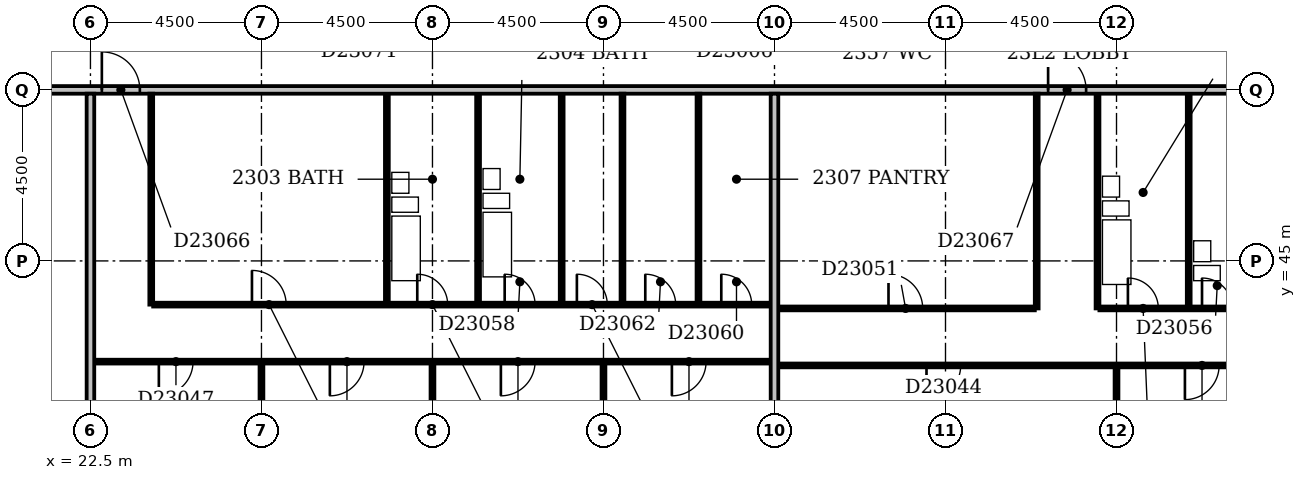
"""IFC4 building model, lengths in metres.
Left out: names, types, materials, properties, quantities, classifications, styles, units other than length and angle.
Written with IfcOpenShell. Run it as: python <this file> out.ifc"""

import sys

from ifc_helpers import new_model, si_unit, direction, frame, frame_2d, origin, place, context, subcontext, project, spatial, rectangle, extrude, element, fill, save


model = new_model("IFC4")
c1 = context("Model", 3, precision=1e-05, world=origin(), true_north=direction((0.0, 1.0)))
c2 = subcontext(c1, "Body", "Model", "MODEL_VIEW")
j1 = project(units=[si_unit("LENGTHUNIT", "METRE"), si_unit("PLANEANGLEUNIT", "RADIAN")], contexts=[c1])
p1 = place(None, origin())
s1 = spatial("IfcSite", under=j1, at=p1, CompositionType="ELEMENT")
p2 = place(p1, origin())
s2 = spatial("IfcBuilding", under=s1, at=p2, CompositionType="ELEMENT")
p3 = place(p2, frame((0.0, 0.0, 93.8)))
s3 = spatial("IfcBuildingStorey", under=s2, at=p3, CompositionType="ELEMENT", Elevation=93.8)
p4 = place(p3, frame((22.5, 36.6, 0.0), z_axis=(0.0, 0.0, 1.0), x_axis=(0.0, 1.0, 0.0)))
e1 = element("IfcWall", 1, at=p4, inside=s3, PredefinedType="PARTITIONING", context=c2, shape_type="SweptSolid", body=[
    extrude(rectangle(XDim=12.8, YDim=0.2, at=frame_2d((6.4, 0.0))), origin(), (0.0, 0.0, 1.0), 3.3),
])
p5 = place(p3, frame((27.0, 36.6, 0.0), z_axis=(0.0, 0.0, 1.0), x_axis=(0.0, 1.0, 0.0)))
e2 = element("IfcWall", 2, at=p5, inside=s3, PredefinedType="PARTITIONING", context=c2, shape_type="SweptSolid", body=[
    extrude(rectangle(XDim=5.7, YDim=0.1, at=frame_2d((2.85, 0.0))), origin(), (0.0, 0.0, 1.0), 2.6),
])
p6 = place(p3, frame((31.5, 36.6, 0.0), z_axis=(0.0, 0.0, 1.0), x_axis=(0.0, 1.0, 0.0)))
e3 = element("IfcWall", 3, at=p6, inside=s3, PredefinedType="PARTITIONING", context=c2, shape_type="SweptSolid", body=[
    extrude(rectangle(XDim=5.7, YDim=0.1, at=frame_2d((2.85, 0.0))), origin(), (0.0, 0.0, 1.0), 3.3),
])
p7 = place(p3, frame((36.0, 36.6, 0.0), z_axis=(0.0, 0.0, 1.0), x_axis=(0.0, 1.0, 0.0)))
e4 = element("IfcWall", 4, at=p7, inside=s3, PredefinedType="PARTITIONING", context=c2, shape_type="SweptSolid", body=[
    extrude(rectangle(XDim=5.7, YDim=0.1, at=frame_2d((2.85, 0.0))), origin(), (0.0, 0.0, 1.0), 2.4),
])
p8 = place(p3, frame((40.5, 36.6, 0.0), z_axis=(0.0, 0.0, 1.0), x_axis=(0.0, 1.0, 0.0)))
e5 = element("IfcWall", 5, at=p8, inside=s3, PredefinedType="PARTITIONING", context=c2, shape_type="SweptSolid", body=[
    extrude(rectangle(XDim=12.8, YDim=0.2, at=frame_2d((6.4, 0.0))), origin(), (0.0, 0.0, 1.0), 3.3),
])
p9 = place(p3, frame((49.5, 36.6, 0.0), z_axis=(0.0, 0.0, 1.0), x_axis=(0.0, 1.0, 0.0)))
e6 = element("IfcWall", 6, at=p9, inside=s3, PredefinedType="PARTITIONING", context=c2, shape_type="SweptSolid", body=[
    extrude(rectangle(XDim=5.6, YDim=0.1, at=frame_2d((2.8, 0.0))), origin(), (0.0, 0.0, 1.0), 3.3),
])
p10 = place(p3, frame((40.6, 42.25, 0.0), z_axis=(0.0, 0.0, 1.0), x_axis=(1.0, 0.0, 0.0)))
e7 = element("IfcWall", 7, at=p10, inside=s3, PredefinedType="PARTITIONING", context=c2, shape_type="SweptSolid", body=[
    extrude(rectangle(XDim=17.8, YDim=0.1, at=frame_2d((8.9, 0.0))), origin(), (0.0, 0.0, 1.0), 3.3),
])
p11 = place(p10, frame((3.9, 0.0, 0.0)))
e8 = element("IfcOpeningElement", 8, at=p11, cuts=e7, PredefinedType="OPENING", context=c2, shape_type="SweptSolid", body=[
    extrude(rectangle(XDim=0.9, YDim=2.1, at=frame_2d((0.45, 1.05))), frame((0.0, 0.062, 0.0), z_axis=(0.0, -1.0, 0.0), x_axis=(1.0, 0.0, 0.0)), (0.0, 0.0, 1.0), 0.124),
])
p12 = place(p10, frame((10.7, 0.0, 0.0)))
e9 = element("IfcOpeningElement", 9, at=p12, cuts=e7, PredefinedType="OPENING", context=c2, shape_type="SweptSolid", body=[
    extrude(rectangle(XDim=0.9, YDim=2.1, at=frame_2d((0.45, 1.05))), frame((0.0, 0.062, 0.0), z_axis=(0.0, -1.0, 0.0), x_axis=(1.0, 0.0, 0.0)), (0.0, 0.0, 1.0), 0.124),
])
p13 = place(p10, frame((14.05, 0.0, 0.0)))
e10 = element("IfcOpeningElement", 10, at=p13, cuts=e7, PredefinedType="OPENING", context=c2, shape_type="SweptSolid", body=[
    extrude(rectangle(XDim=0.9, YDim=2.1, at=frame_2d((0.45, 1.05))), frame((0.0, 0.062, 0.0), z_axis=(0.0, -1.0, 0.0), x_axis=(1.0, 0.0, 0.0)), (0.0, 0.0, 1.0), 0.124),
])
p14 = place(p3, frame((22.6, 42.35, 0.0), z_axis=(0.0, 0.0, 1.0), x_axis=(1.0, 0.0, 0.0)))
e11 = element("IfcWall", 11, at=p14, inside=s3, PredefinedType="PARTITIONING", context=c2, shape_type="SweptSolid", body=[
    extrude(rectangle(XDim=17.8, YDim=0.1, at=frame_2d((8.9, 0.0))), origin(), (0.0, 0.0, 1.0), 3.3),
])
p15 = place(p14, frame((1.7, 0.0, 0.0)))
e12 = element("IfcOpeningElement", 12, at=p15, cuts=e11, PredefinedType="OPENING", context=c2, shape_type="SweptSolid", body=[
    extrude(rectangle(XDim=0.9, YDim=2.1, at=frame_2d((0.45, 1.05))), frame((0.0, 0.062, 0.0), z_axis=(0.0, -1.0, 0.0), x_axis=(1.0, 0.0, 0.0)), (0.0, 0.0, 1.0), 0.124),
])
p16 = place(p14, frame((6.2, 0.0, 0.0)))
e13 = element("IfcOpeningElement", 13, at=p16, cuts=e11, PredefinedType="OPENING", context=c2, shape_type="SweptSolid", body=[
    extrude(rectangle(XDim=0.9, YDim=2.1, at=frame_2d((0.45, 1.05))), frame((0.0, 0.062, 0.0), z_axis=(0.0, -1.0, 0.0), x_axis=(1.0, 0.0, 0.0)), (0.0, 0.0, 1.0), 0.124),
])
p17 = place(p14, frame((10.7, 0.0, 0.0)))
e14 = element("IfcOpeningElement", 14, at=p17, cuts=e11, PredefinedType="OPENING", context=c2, shape_type="SweptSolid", body=[
    extrude(rectangle(XDim=0.9, YDim=2.1, at=frame_2d((0.45, 1.05))), frame((0.0, 0.062, 0.0), z_axis=(0.0, -1.0, 0.0), x_axis=(1.0, 0.0, 0.0)), (0.0, 0.0, 1.0), 0.124),
])
p18 = place(p14, frame((15.2, 0.0, 0.0)))
e15 = element("IfcOpeningElement", 15, at=p18, cuts=e11, PredefinedType="OPENING", context=c2, shape_type="SweptSolid", body=[
    extrude(rectangle(XDim=0.9, YDim=2.1, at=frame_2d((0.45, 1.05))), frame((0.0, 0.062, 0.0), z_axis=(0.0, -1.0, 0.0), x_axis=(1.0, 0.0, 0.0)), (0.0, 0.0, 1.0), 0.124),
])
p19 = place(p3, frame((40.6, 43.75, 0.0), z_axis=(0.0, 0.0, 1.0), x_axis=(1.0, 0.0, 0.0)))
e16 = element("IfcWall", 16, at=p19, inside=s3, PredefinedType="PARTITIONING", context=c2, shape_type="SweptSolid", body=[
    extrude(rectangle(XDim=6.75, YDim=0.1, at=frame_2d((3.375, 0.0))), origin(), (0.0, 0.0, 1.0), 3.3),
])
p20 = place(p19, frame((2.9, 0.0, 0.0)))
e17 = element("IfcOpeningElement", 17, at=p20, cuts=e16, PredefinedType="OPENING", context=c2, shape_type="SweptSolid", body=[
    extrude(rectangle(XDim=0.9, YDim=2.1, at=frame_2d((0.45, 1.05))), frame((0.0, 0.062, 0.0), z_axis=(0.0, -1.0, 0.0), x_axis=(1.0, 0.0, 0.0)), (0.0, 0.0, 1.0), 0.124),
])
p21 = place(p3, frame((47.4, 43.75, 0.0), z_axis=(0.0, 0.0, 1.0), x_axis=(0.0, 1.0, 0.0)))
e18 = element("IfcWall", 18, at=p21, inside=s3, PredefinedType="PARTITIONING", context=c2, shape_type="SweptSolid", body=[
    extrude(rectangle(XDim=5.65, YDim=0.1, at=frame_2d((2.825, 0.0))), origin(), (0.0, 0.0, 1.0), 3.3),
])
p22 = place(p3, frame((49.0, 43.75, 0.0), z_axis=(0.0, 0.0, 1.0), x_axis=(0.0, 1.0, 0.0)))
e19 = element("IfcWall", 19, at=p22, inside=s3, PredefinedType="PLUMBINGWALL", context=c2, shape_type="SweptSolid", body=[
    extrude(rectangle(XDim=5.65, YDim=0.1, at=frame_2d((2.825, 0.0))), origin(), (0.0, 0.0, 1.0), 3.3),
])
p23 = place(p3, frame((49.05, 43.75, 0.0), z_axis=(0.0, 0.0, 1.0), x_axis=(1.0, 0.0, 0.0)))
e20 = element("IfcWall", 20, at=p23, inside=s3, PredefinedType="PARTITIONING", context=c2, shape_type="SweptSolid", body=[
    extrude(rectangle(XDim=9.35, YDim=0.1, at=frame_2d((4.675, 0.0))), origin(), (0.0, 0.0, 1.0), 3.3),
])
p24 = place(p23, frame((0.75, 0.0, 0.0)))
e21 = element("IfcOpeningElement", 21, at=p24, cuts=e20, PredefinedType="OPENING", context=c2, shape_type="SweptSolid", body=[
    extrude(rectangle(XDim=0.8, YDim=2.1, at=frame_2d((0.4, 1.05))), frame((0.0, 0.062, 0.0), z_axis=(0.0, -1.0, 0.0), x_axis=(1.0, 0.0, 0.0)), (0.0, 0.0, 1.0), 0.124),
])
p25 = place(p23, frame((8.05, 0.0, 0.0)))
e22 = element("IfcOpeningElement", 22, at=p25, cuts=e20, PredefinedType="OPENING", context=c2, shape_type="SweptSolid", body=[
    extrude(rectangle(XDim=0.8, YDim=2.1, at=frame_2d((0.4, 1.05))), frame((0.0, 0.062, 0.0), z_axis=(0.0, -1.0, 0.0), x_axis=(1.0, 0.0, 0.0)), (0.0, 0.0, 1.0), 0.124),
])
p26 = place(p23, frame((4.25, 0.0, 0.0)))
e23 = element("IfcOpeningElement", 23, at=p26, cuts=e20, PredefinedType="OPENING", context=c2, shape_type="SweptSolid", body=[
    extrude(rectangle(XDim=0.8, YDim=2.1, at=frame_2d((0.4, 1.05))), frame((0.0, 0.062, 0.0), z_axis=(0.0, -1.0, 0.0), x_axis=(1.0, 0.0, 0.0)), (0.0, 0.0, 1.0), 0.124),
])
p27 = place(p23, frame((6.05, 0.0, 0.0)))
e24 = element("IfcOpeningElement", 24, at=p27, cuts=e20, PredefinedType="OPENING", context=c2, shape_type="SweptSolid", body=[
    extrude(rectangle(XDim=0.8, YDim=2.1, at=frame_2d((0.4, 1.05))), frame((0.0, 0.062, 0.0), z_axis=(0.0, -1.0, 0.0), x_axis=(1.0, 0.0, 0.0)), (0.0, 0.0, 1.0), 0.124),
])
p28 = place(p23, frame((2.7, 0.0, 0.0)))
e25 = element("IfcOpeningElement", 25, at=p28, cuts=e20, PredefinedType="OPENING", context=c2, shape_type="SweptSolid", body=[
    extrude(rectangle(XDim=0.8, YDim=2.1, at=frame_2d((0.4, 1.05))), frame((0.0, 0.062, 0.0), z_axis=(0.0, -1.0, 0.0), x_axis=(1.0, 0.0, 0.0)), (0.0, 0.0, 1.0), 0.124),
])
p29 = place(p3, frame((51.4, 43.8, 0.0), z_axis=(0.0, 0.0, 1.0), x_axis=(0.0, 1.0, 0.0)))
e26 = element("IfcWall", 26, at=p29, inside=s3, PredefinedType="PLUMBINGWALL", context=c2, shape_type="SweptSolid", body=[
    extrude(rectangle(XDim=5.6, YDim=0.1, at=frame_2d((2.8, 0.0))), origin(), (0.0, 0.0, 1.0), 3.3),
])
p30 = place(p3, frame((24.1, 43.85, 0.0), z_axis=(0.0, 0.0, 1.0), x_axis=(0.0, 1.0, 0.0)))
e27 = element("IfcWall", 27, at=p30, inside=s3, PredefinedType="PARTITIONING", context=c2, shape_type="SweptSolid", body=[
    extrude(rectangle(XDim=5.55, YDim=0.1, at=frame_2d((2.775, 0.0))), origin(), (0.0, 0.0, 1.0), 3.3),
])
p31 = place(p3, frame((24.15, 43.85, 0.0), z_axis=(0.0, 0.0, 1.0), x_axis=(1.0, 0.0, 0.0)))
e28 = element("IfcWall", 28, at=p31, inside=s3, PredefinedType="PARTITIONING", context=c2, shape_type="SweptSolid", body=[
    extrude(rectangle(XDim=16.25, YDim=0.1, at=frame_2d((8.125, 0.0))), origin(), (0.0, 0.0, 1.0), 3.3),
])
p32 = place(p31, frame((6.95, 0.0, 0.0)))
e29 = element("IfcOpeningElement", 29, at=p32, cuts=e28, PredefinedType="OPENING", context=c2, shape_type="SweptSolid", body=[
    extrude(rectangle(XDim=0.8, YDim=2.1, at=frame_2d((0.4, 1.05))), frame((0.0, 0.062, 0.0), z_axis=(0.0, -1.0, 0.0), x_axis=(1.0, 0.0, 0.0)), (0.0, 0.0, 1.0), 0.124),
])
p33 = place(p31, frame((9.25, 0.0, 0.0)))
e30 = element("IfcOpeningElement", 30, at=p33, cuts=e28, PredefinedType="OPENING", context=c2, shape_type="SweptSolid", body=[
    extrude(rectangle(XDim=0.8, YDim=2.1, at=frame_2d((0.4, 1.05))), frame((0.0, 0.062, 0.0), z_axis=(0.0, -1.0, 0.0), x_axis=(1.0, 0.0, 0.0)), (0.0, 0.0, 1.0), 0.124),
])
p34 = place(p31, frame((2.6, 0.0, 0.0)))
e31 = element("IfcOpeningElement", 31, at=p34, cuts=e28, PredefinedType="OPENING", context=c2, shape_type="SweptSolid", body=[
    extrude(rectangle(XDim=0.9, YDim=2.1, at=frame_2d((0.45, 1.05))), frame((0.0, 0.062, 0.0), z_axis=(0.0, -1.0, 0.0), x_axis=(1.0, 0.0, 0.0)), (0.0, 0.0, 1.0), 0.124),
])
p35 = place(p31, frame((14.95, 0.0, 0.0)))
e32 = element("IfcOpeningElement", 32, at=p35, cuts=e28, PredefinedType="OPENING", context=c2, shape_type="SweptSolid", body=[
    extrude(rectangle(XDim=0.8, YDim=2.1, at=frame_2d((0.4, 1.05))), frame((0.0, 0.062, 0.0), z_axis=(0.0, -1.0, 0.0), x_axis=(1.0, 0.0, 0.0)), (0.0, 0.0, 1.0), 0.124),
])
p36 = place(p31, frame((11.15, 0.0, 0.0)))
e33 = element("IfcOpeningElement", 33, at=p36, cuts=e28, PredefinedType="OPENING", context=c2, shape_type="SweptSolid", body=[
    extrude(rectangle(XDim=0.8, YDim=2.1, at=frame_2d((0.4, 1.05))), frame((0.0, 0.062, 0.0), z_axis=(0.0, -1.0, 0.0), x_axis=(1.0, 0.0, 0.0)), (0.0, 0.0, 1.0), 0.124),
])
p37 = place(p31, frame((12.95, 0.0, 0.0)))
e34 = element("IfcOpeningElement", 34, at=p37, cuts=e28, PredefinedType="OPENING", context=c2, shape_type="SweptSolid", body=[
    extrude(rectangle(XDim=0.8, YDim=2.1, at=frame_2d((0.4, 1.05))), frame((0.0, 0.062, 0.0), z_axis=(0.0, -1.0, 0.0), x_axis=(1.0, 0.0, 0.0)), (0.0, 0.0, 1.0), 0.124),
])
for number, where, z_axis, x_axis in (
    (35, (30.3, 43.9, 0.0), (0.0, 0.0, 1.0), (0.0, 1.0, 0.0)),
    (36, (32.7, 43.9, 0.0), (0.0, 0.0, 1.0), (0.0, 1.0, 0.0)),
    (37, (34.9, 43.9, 0.0), (0.0, 0.0, 1.0), (0.0, 1.0, 0.0)),
):
    element("IfcWall", number, at=place(p3, frame(where, z_axis=z_axis, x_axis=x_axis)), inside=s3, PredefinedType="PLUMBINGWALL", context=c2, shape_type="SweptSolid", body=[
        extrude(rectangle(XDim=5.5, YDim=0.1, at=frame_2d((2.75, 0.0))), origin(), (0.0, 0.0, 1.0), 3.3),
    ])
p38 = place(p3, frame((36.5, 43.9, 0.0), z_axis=(0.0, 0.0, 1.0), x_axis=(0.0, 1.0, 0.0)))
e38 = element("IfcWall", 38, at=p38, inside=s3, PredefinedType="PARTITIONING", context=c2, shape_type="SweptSolid", body=[
    extrude(rectangle(XDim=5.5, YDim=0.1, at=frame_2d((2.75, 0.0))), origin(), (0.0, 0.0, 1.0), 2.4),
])
p39 = place(p3, frame((38.5, 43.9, 0.0), z_axis=(0.0, 0.0, 1.0), x_axis=(0.0, 1.0, 0.0)))
e39 = element("IfcWall", 39, at=p39, inside=s3, PredefinedType="PARTITIONING", context=c2, shape_type="SweptSolid", body=[
    extrude(rectangle(XDim=5.5, YDim=0.1, at=frame_2d((2.75, 0.0))), origin(), (0.0, 0.0, 1.0), 3.3),
])
p40 = place(p3, frame((9.1, 49.5, 0.0), z_axis=(0.0, 0.0, 1.0), x_axis=(1.0, 0.0, 0.0)))
e40 = element("IfcWall", 40, at=p40, inside=s3, PredefinedType="PARTITIONING", context=c2, shape_type="SweptSolid", body=[
    extrude(rectangle(XDim=57.8, YDim=0.2, at=frame_2d((28.9, 0.0))), origin(), (0.0, 0.0, 1.0), 3.3),
])
p41 = place(p40, frame((13.7, 0.0, 0.0)))
e41 = element("IfcOpeningElement", 41, at=p41, cuts=e40, PredefinedType="OPENING", context=c2, shape_type="SweptSolid", body=[
    extrude(rectangle(XDim=1.0, YDim=2.1, at=frame_2d((0.5, 1.05))), frame((0.0, 0.112, 0.0), z_axis=(0.0, -1.0, 0.0), x_axis=(1.0, 0.0, 0.0)), (0.0, 0.0, 1.0), 0.224),
])
p42 = place(p40, frame((38.6, 0.0, 0.0)))
e42 = element("IfcOpeningElement", 42, at=p42, cuts=e40, PredefinedType="OPENING", context=c2, shape_type="SweptSolid", body=[
    extrude(rectangle(XDim=1.0, YDim=2.1, at=frame_2d((0.5, 1.05))), frame((0.0, 0.112, 0.0), z_axis=(0.0, -1.0, 0.0), x_axis=(1.0, 0.0, 0.0)), (0.0, 0.0, 1.0), 0.224),
])
p43 = place(p40, frame((52.1, 0.0, 0.0)))
e43 = element("IfcOpeningElement", 43, at=p43, cuts=e40, PredefinedType="OPENING", context=c2, shape_type="SweptSolid", body=[
    extrude(rectangle(XDim=1.0, YDim=2.1, at=frame_2d((0.5, 1.05))), frame((0.0, 0.112, 0.0), z_axis=(0.0, -1.0, 0.0), x_axis=(1.0, 0.0, 0.0)), (0.0, 0.0, 1.0), 0.224),
])
p44 = place(p40, frame((6.15, 0.0, 0.0)))
e44 = element("IfcOpeningElement", 44, at=p44, cuts=e40, PredefinedType="OPENING", context=c2, shape_type="SweptSolid", body=[
    extrude(rectangle(XDim=0.9, YDim=2.1, at=frame_2d((0.45, 1.05))), frame((0.0, 0.112, 0.0), z_axis=(0.0, -1.0, 0.0), x_axis=(1.0, 0.0, 0.0)), (0.0, 0.0, 1.0), 0.224),
])
p45 = place(p40, frame((10.65, 0.0, 0.0)))
e45 = element("IfcOpeningElement", 45, at=p45, cuts=e40, PredefinedType="OPENING", context=c2, shape_type="SweptSolid", body=[
    extrude(rectangle(XDim=0.9, YDim=2.1, at=frame_2d((0.45, 1.05))), frame((0.0, 0.112, 0.0), z_axis=(0.0, -1.0, 0.0), x_axis=(1.0, 0.0, 0.0)), (0.0, 0.0, 1.0), 0.224),
])
p46 = place(p11, frame((0.9, 0.0, 0.0), z_axis=(0.0, 0.0, 1.0), x_axis=(-1.0, 0.0, 0.0)))
e46 = element("IfcDoor", 46, at=p46, inside=s3, OperationType="SINGLE_SWING_RIGHT", PredefinedType="DOOR", context=c2, shape_type="SweptSolid", body=[
    extrude(rectangle(XDim=0.9, YDim=2.1, at=frame_2d((0.45, 1.05))), frame((0.0, 0.025, 0.0), z_axis=(0.0, -1.0, 0.0), x_axis=(1.0, 0.0, 0.0)), (0.0, 0.0, 1.0), 0.05),
])
fill(e8, e46)
p47 = place(p12, frame((0.9, 0.0, 0.0), z_axis=(0.0, 0.0, 1.0), x_axis=(-1.0, 0.0, 0.0)))
e47 = element("IfcDoor", 47, at=p47, inside=s3, OperationType="SINGLE_SWING_RIGHT", PredefinedType="DOOR", context=c2, shape_type="SweptSolid", body=[
    extrude(rectangle(XDim=0.9, YDim=2.1, at=frame_2d((0.45, 1.05))), frame((0.0, 0.025, 0.0), z_axis=(0.0, -1.0, 0.0), x_axis=(1.0, 0.0, 0.0)), (0.0, 0.0, 1.0), 0.05),
])
fill(e9, e47)
p48 = place(p15, frame((0.9, 0.0, 0.0), z_axis=(0.0, 0.0, 1.0), x_axis=(-1.0, 0.0, 0.0)))
e48 = element("IfcDoor", 48, at=p48, inside=s3, OperationType="SINGLE_SWING_RIGHT", PredefinedType="DOOR", context=c2, shape_type="SweptSolid", body=[
    extrude(rectangle(XDim=0.9, YDim=2.1, at=frame_2d((0.45, 1.05))), frame((0.0, 0.025, 0.0), z_axis=(0.0, -1.0, 0.0), x_axis=(1.0, 0.0, 0.0)), (0.0, 0.0, 1.0), 0.05),
])
fill(e12, e48)
p49 = place(p16, frame((0.9, 0.0, 0.0), z_axis=(0.0, 0.0, 1.0), x_axis=(-1.0, 0.0, 0.0)))
e49 = element("IfcDoor", 49, at=p49, inside=s3, OperationType="SINGLE_SWING_RIGHT", PredefinedType="DOOR", context=c2, shape_type="SweptSolid", body=[
    extrude(rectangle(XDim=0.9, YDim=2.1, at=frame_2d((0.45, 1.05))), frame((0.0, 0.025, 0.0), z_axis=(0.0, -1.0, 0.0), x_axis=(1.0, 0.0, 0.0)), (0.0, 0.0, 1.0), 0.05),
])
fill(e13, e49)
p50 = place(p17, frame((0.9, 0.0, 0.0), z_axis=(0.0, 0.0, 1.0), x_axis=(-1.0, 0.0, 0.0)))
e50 = element("IfcDoor", 50, at=p50, inside=s3, OperationType="SINGLE_SWING_RIGHT", PredefinedType="DOOR", context=c2, shape_type="SweptSolid", body=[
    extrude(rectangle(XDim=0.9, YDim=2.1, at=frame_2d((0.45, 1.05))), frame((0.0, 0.025, 0.0), z_axis=(0.0, -1.0, 0.0), x_axis=(1.0, 0.0, 0.0)), (0.0, 0.0, 1.0), 0.05),
])
fill(e14, e50)
p51 = place(p18, frame((0.9, 0.0, 0.0), z_axis=(0.0, 0.0, 1.0), x_axis=(-1.0, 0.0, 0.0)))
e51 = element("IfcDoor", 51, at=p51, inside=s3, OperationType="SINGLE_SWING_RIGHT", PredefinedType="DOOR", context=c2, shape_type="SweptSolid", body=[
    extrude(rectangle(XDim=0.9, YDim=2.1, at=frame_2d((0.45, 1.05))), frame((0.0, 0.025, 0.0), z_axis=(0.0, -1.0, 0.0), x_axis=(1.0, 0.0, 0.0)), (0.0, 0.0, 1.0), 0.05),
])
fill(e15, e51)
p52 = place(p20, origin())
e52 = element("IfcDoor", 52, at=p52, inside=s3, OperationType="SINGLE_SWING_LEFT", PredefinedType="DOOR", context=c2, shape_type="SweptSolid", body=[
    extrude(rectangle(XDim=0.9, YDim=2.1, at=frame_2d((0.45, 1.05))), frame((0.0, 0.025, 0.0), z_axis=(0.0, -1.0, 0.0), x_axis=(1.0, 0.0, 0.0)), (0.0, 0.0, 1.0), 0.05),
])
fill(e17, e52)
p53 = place(p24, origin())
e53 = element("IfcDoor", 53, at=p53, inside=s3, OperationType="SINGLE_SWING_LEFT", PredefinedType="DOOR", context=c2, shape_type="SweptSolid", body=[
    extrude(rectangle(XDim=0.8, YDim=2.1, at=frame_2d((0.4, 1.05))), frame((0.0, 0.025, 0.0), z_axis=(0.0, -1.0, 0.0), x_axis=(1.0, 0.0, 0.0)), (0.0, 0.0, 1.0), 0.05),
])
fill(e21, e53)
p54 = place(p28, origin())
e54 = element("IfcDoor", 54, at=p54, inside=s3, OperationType="SINGLE_SWING_LEFT", PredefinedType="DOOR", context=c2, shape_type="SweptSolid", body=[
    extrude(rectangle(XDim=0.8, YDim=2.1, at=frame_2d((0.4, 1.05))), frame((0.0, 0.025, 0.0), z_axis=(0.0, -1.0, 0.0), x_axis=(1.0, 0.0, 0.0)), (0.0, 0.0, 1.0), 0.05),
])
fill(e25, e54)
p55 = place(p32, origin())
e55 = element("IfcDoor", 55, at=p55, inside=s3, OperationType="SINGLE_SWING_LEFT", PredefinedType="DOOR", context=c2, shape_type="SweptSolid", body=[
    extrude(rectangle(XDim=0.8, YDim=2.1, at=frame_2d((0.4, 1.05))), frame((0.0, 0.025, 0.0), z_axis=(0.0, -1.0, 0.0), x_axis=(1.0, 0.0, 0.0)), (0.0, 0.0, 1.0), 0.05),
])
fill(e29, e55)
p56 = place(p33, origin())
e56 = element("IfcDoor", 56, at=p56, inside=s3, OperationType="SINGLE_SWING_LEFT", PredefinedType="DOOR", context=c2, shape_type="SweptSolid", body=[
    extrude(rectangle(XDim=0.8, YDim=2.1, at=frame_2d((0.4, 1.05))), frame((0.0, 0.025, 0.0), z_axis=(0.0, -1.0, 0.0), x_axis=(1.0, 0.0, 0.0)), (0.0, 0.0, 1.0), 0.05),
])
fill(e30, e56)
p57 = place(p34, origin())
e57 = element("IfcDoor", 57, at=p57, inside=s3, OperationType="SINGLE_SWING_LEFT", PredefinedType="DOOR", context=c2, shape_type="SweptSolid", body=[
    extrude(rectangle(XDim=0.9, YDim=2.1, at=frame_2d((0.45, 1.05))), frame((0.0, 0.025, 0.0), z_axis=(0.0, -1.0, 0.0), x_axis=(1.0, 0.0, 0.0)), (0.0, 0.0, 1.0), 0.05),
])
fill(e31, e57)
p58 = place(p35, origin())
e58 = element("IfcDoor", 58, at=p58, inside=s3, OperationType="SINGLE_SWING_LEFT", PredefinedType="DOOR", context=c2, shape_type="SweptSolid", body=[
    extrude(rectangle(XDim=0.8, YDim=2.1, at=frame_2d((0.4, 1.05))), frame((0.0, 0.025, 0.0), z_axis=(0.0, -1.0, 0.0), x_axis=(1.0, 0.0, 0.0)), (0.0, 0.0, 1.0), 0.05),
])
fill(e32, e58)
p59 = place(p36, origin())
e59 = element("IfcDoor", 59, at=p59, inside=s3, OperationType="SINGLE_SWING_LEFT", PredefinedType="DOOR", context=c2, shape_type="SweptSolid", body=[
    extrude(rectangle(XDim=0.8, YDim=2.1, at=frame_2d((0.4, 1.05))), frame((0.0, 0.025, 0.0), z_axis=(0.0, -1.0, 0.0), x_axis=(1.0, 0.0, 0.0)), (0.0, 0.0, 1.0), 0.05),
])
fill(e33, e59)
p60 = place(p37, origin())
e60 = element("IfcDoor", 60, at=p60, inside=s3, OperationType="SINGLE_SWING_LEFT", PredefinedType="DOOR", context=c2, shape_type="SweptSolid", body=[
    extrude(rectangle(XDim=0.8, YDim=2.1, at=frame_2d((0.4, 1.05))), frame((0.0, 0.025, 0.0), z_axis=(0.0, -1.0, 0.0), x_axis=(1.0, 0.0, 0.0)), (0.0, 0.0, 1.0), 0.05),
])
fill(e34, e60)
p61 = place(p41, origin())
e61 = element("IfcDoor", 61, at=p61, inside=s3, OperationType="SINGLE_SWING_LEFT", PredefinedType="DOOR", context=c2, shape_type="SweptSolid", body=[
    extrude(rectangle(XDim=1.0, YDim=2.1, at=frame_2d((0.5, 1.05))), frame((0.0, 0.025, 0.0), z_axis=(0.0, -1.0, 0.0), x_axis=(1.0, 0.0, 0.0)), (0.0, 0.0, 1.0), 0.05),
])
fill(e41, e61)
p62 = place(p42, origin())
e62 = element("IfcDoor", 62, at=p62, inside=s3, OperationType="SINGLE_SWING_LEFT", PredefinedType="DOOR", context=c2, shape_type="SweptSolid", body=[
    extrude(rectangle(XDim=1.0, YDim=2.1, at=frame_2d((0.5, 1.05))), frame((0.0, 0.025, 0.0), z_axis=(0.0, -1.0, 0.0), x_axis=(1.0, 0.0, 0.0)), (0.0, 0.0, 1.0), 0.05),
])
fill(e42, e62)
save(model, sys.argv[1])
